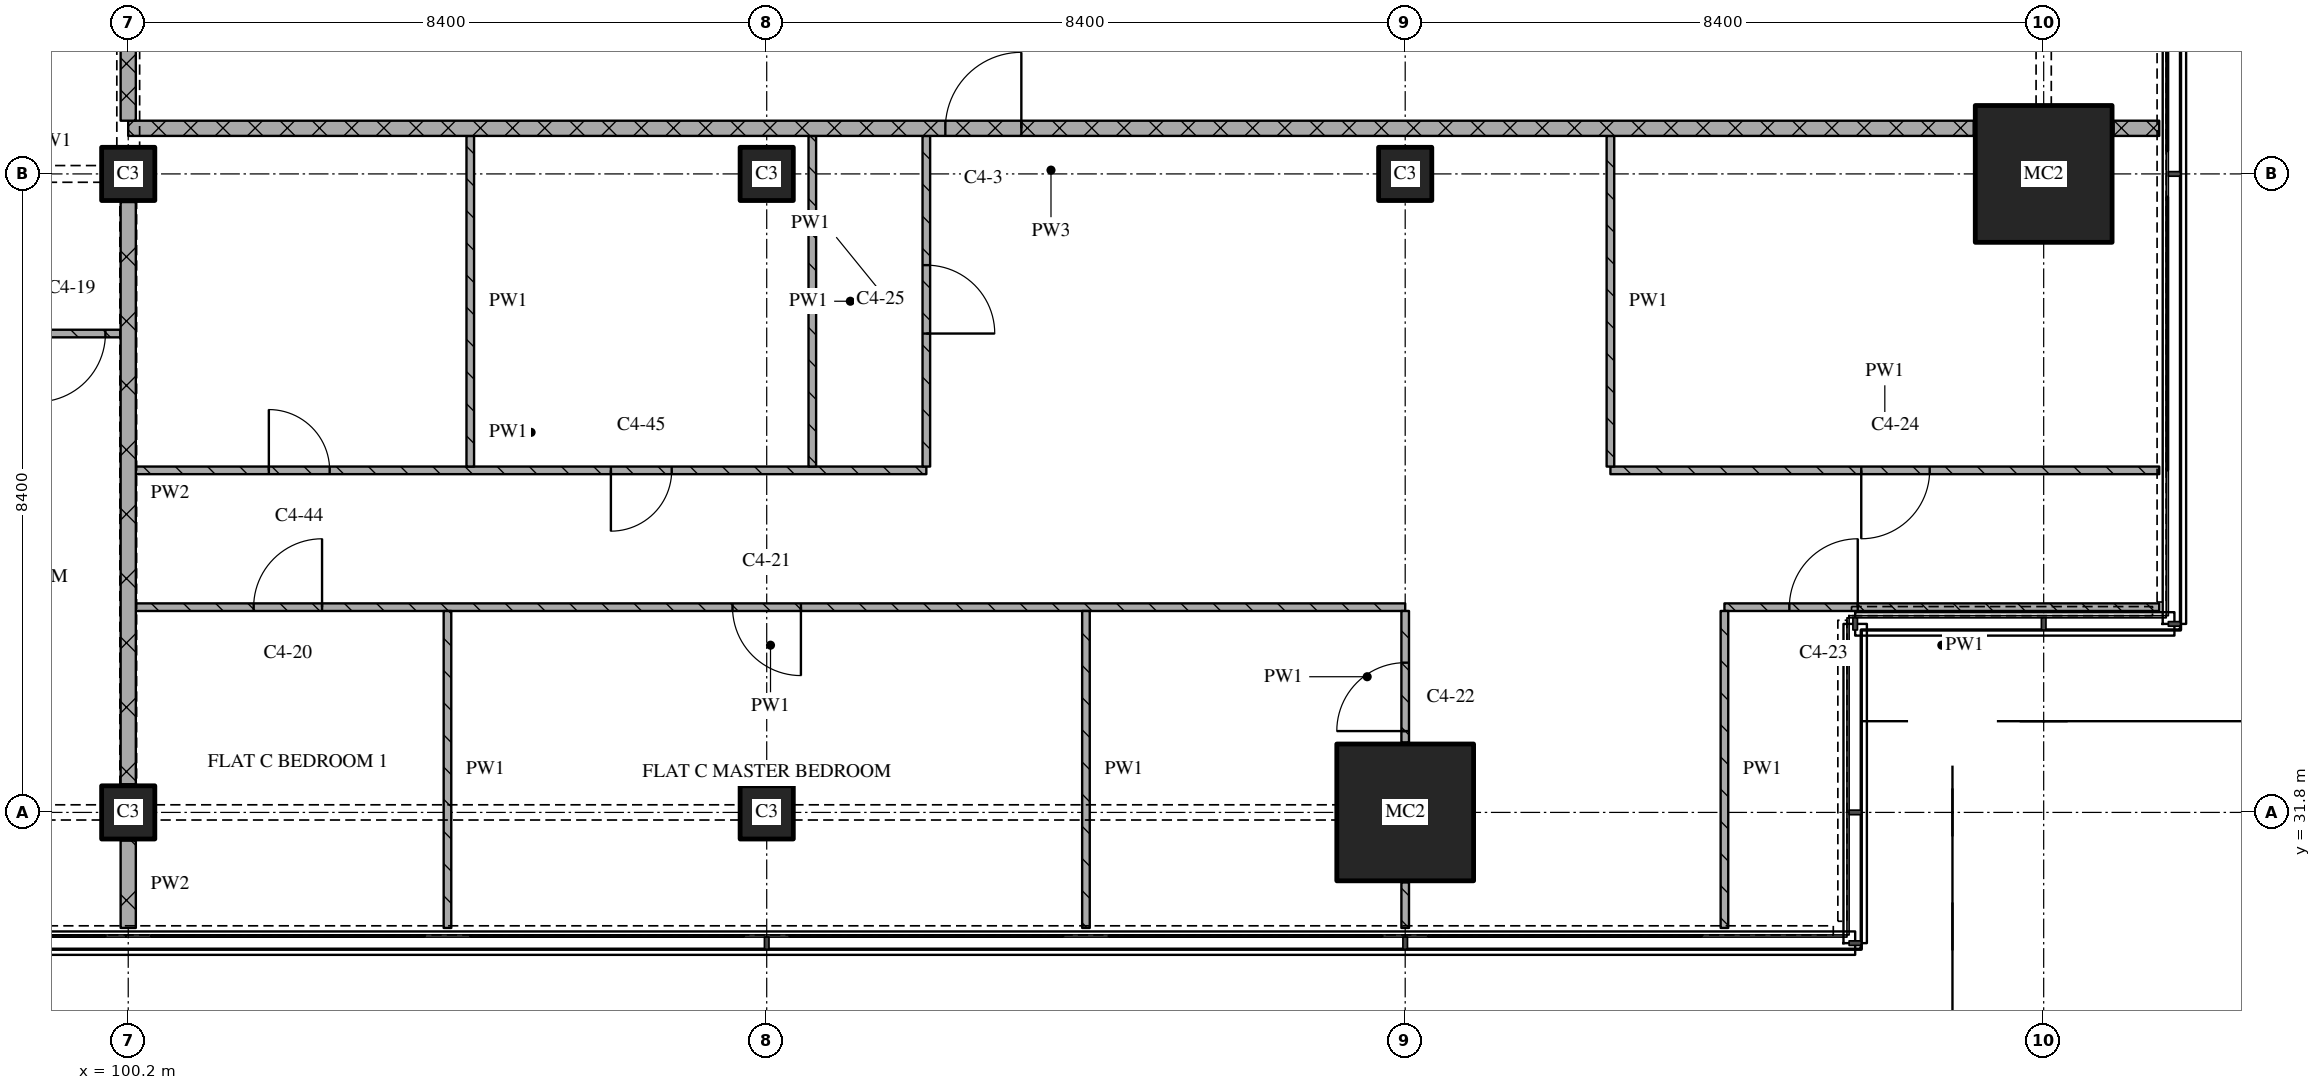
"""IFC4 building model, lengths in metres.
Left out: names, types, materials, properties, quantities, classifications, styles, units other than length and angle.
Written with IfcOpenShell. Run it as: python <this file> out.ifc"""

import sys

from ifc_helpers import new_model, si_unit, direction, frame, frame_2d, origin, origin_2d, place, context, subcontext, project, spatial, rectangle, extrude, element, fill, save


model = new_model("IFC4")
c1 = context("Model", 3, precision=1e-05, world=origin(), true_north=direction((0.0, 1.0)))
c2 = subcontext(c1, "Body", "Model", "MODEL_VIEW")
j1 = project(units=[si_unit("LENGTHUNIT", "METRE"), si_unit("PLANEANGLEUNIT", "RADIAN")], contexts=[c1])
p1 = place(None, origin())
s1 = spatial("IfcSite", under=j1, at=p1, CompositionType="ELEMENT")
p2 = place(p1, origin())
s2 = spatial("IfcBuilding", under=s1, at=p2, CompositionType="ELEMENT")
p3 = place(p2, frame((0.0, 0.0, 179.85)))
s3 = spatial("IfcBuildingStorey", under=s2, at=p3, CompositionType="ELEMENT", Elevation=179.85)
for number, where, z_axis, x_axis in (
    (1, (100.2, 31.8, 0.0), (0.0, 0.0, 1.0), (1.0, 0.0, 0.0)),
    (2, (100.2, 40.2, 0.0), (0.0, 0.0, 1.0), (1.0, 0.0, 0.0)),
    (3, (108.6, 31.8, 0.0), (0.0, 0.0, 1.0), (1.0, 0.0, 0.0)),
    (4, (108.6, 40.2, 0.0), (0.0, 0.0, 1.0), (1.0, 0.0, 0.0)),
):
    element("IfcColumn", number, at=place(p3, frame(where, z_axis=z_axis, x_axis=x_axis)), inside=s3, PredefinedType="COLUMN", context=c2, shape_type="SweptSolid", body=[
        extrude(rectangle(XDim=0.7, YDim=0.7, at=origin_2d()), origin(), (0.0, 0.0, 1.0), 3.6),
    ])
p4 = place(p3, frame((117.0, 31.8, 0.0), z_axis=(0.0, 0.0, 1.0), x_axis=(1.0, 0.0, 0.0)))
e5 = element("IfcColumn", 5, at=p4, inside=s3, PredefinedType="COLUMN", context=c2, shape_type="SweptSolid", body=[
    extrude(rectangle(XDim=1.8, YDim=1.8, at=origin_2d()), origin(), (0.0, 0.0, 1.0), 3.6),
])
p5 = place(p3, frame((117.0, 40.2, 0.0), z_axis=(0.0, 0.0, 1.0), x_axis=(1.0, 0.0, 0.0)))
e6 = element("IfcColumn", 6, at=p5, inside=s3, PredefinedType="COLUMN", context=c2, shape_type="SweptSolid", body=[
    extrude(rectangle(XDim=0.7, YDim=0.7, at=origin_2d()), origin(), (0.0, 0.0, 1.0), 3.6),
])
p6 = place(p3, frame((125.4, 40.2, 0.0), z_axis=(0.0, 0.0, 1.0), x_axis=(1.0, 0.0, 0.0)))
e7 = element("IfcColumn", 7, at=p6, inside=s3, PredefinedType="COLUMN", context=c2, shape_type="SweptSolid", body=[
    extrude(rectangle(XDim=1.8, YDim=1.8, at=origin_2d()), origin(), (0.0, 0.0, 1.0), 3.6),
])
p7 = place(p3, frame((117.0, 34.5, 0.0), z_axis=(0.0, 0.0, 1.0), x_axis=(-1.0, 0.0, 0.0)))
e8 = element("IfcWall", 8, at=p7, inside=s3, PredefinedType="PARTITIONING", context=c2, shape_type="SweptSolid", body=[
    extrude(rectangle(XDim=16.7, YDim=0.1, at=frame_2d((8.35, 0.0))), origin(), (0.0, 0.0, 1.0), 3.32),
])
p8 = place(p7, frame((7.95, 0.0, 0.0)))
e9 = element("IfcOpeningElement", 9, at=p8, cuts=e8, PredefinedType="OPENING", context=c2, shape_type="SweptSolid", body=[
    extrude(rectangle(XDim=0.9, YDim=2.1, at=frame_2d((0.45, 1.05))), frame((0.0, 0.06, 0.0), z_axis=(0.0, -1.0, 0.0), x_axis=(1.0, 0.0, 0.0)), (0.0, 0.0, 1.0), 0.12),
])
p9 = place(p7, frame((14.25, 0.0, 0.0)))
e10 = element("IfcOpeningElement", 10, at=p9, cuts=e8, PredefinedType="OPENING", context=c2, shape_type="SweptSolid", body=[
    extrude(rectangle(XDim=0.9, YDim=2.1, at=frame_2d((0.45, 1.05))), frame((0.0, 0.06, 0.0), z_axis=(0.0, -1.0, 0.0), x_axis=(1.0, 0.0, 0.0)), (0.0, 0.0, 1.0), 0.12),
])
p10 = place(p3, frame((126.92, 34.5, 0.0), z_axis=(0.0, 0.0, 1.0), x_axis=(-1.0, 0.0, 0.0)))
e11 = element("IfcWall", 11, at=p10, inside=s3, PredefinedType="PARTITIONING", context=c2, shape_type="SweptSolid", body=[
    extrude(rectangle(XDim=5.72, YDim=0.1, at=frame_2d((2.86, 0.0))), origin(), (0.0, 0.0, 1.0), 3.32),
])
p11 = place(p10, frame((3.966, 0.0, 0.0)))
e12 = element("IfcOpeningElement", 12, at=p11, cuts=e11, PredefinedType="OPENING", context=c2, shape_type="SweptSolid", body=[
    extrude(rectangle(XDim=0.9, YDim=2.1, at=frame_2d((0.45, 1.05))), frame((0.0, 0.06, 0.0), z_axis=(0.0, -1.0, 0.0), x_axis=(1.0, 0.0, 0.0)), (0.0, 0.0, 1.0), 0.12),
])
p12 = place(p3, frame((100.3, 36.3, 0.0), z_axis=(0.0, 0.0, 1.0), x_axis=(1.0, 0.0, 0.0)))
e13 = element("IfcWall", 13, at=p12, inside=s3, PredefinedType="PARTITIONING", context=c2, shape_type="SweptSolid", body=[
    extrude(rectangle(XDim=10.4, YDim=0.1, at=frame_2d((5.2, 0.0))), origin(), (0.0, 0.0, 1.0), 3.32),
])
p13 = place(p12, frame((1.75, 0.0, 0.0)))
e14 = element("IfcOpeningElement", 14, at=p13, cuts=e13, PredefinedType="OPENING", context=c2, shape_type="SweptSolid", body=[
    extrude(rectangle(XDim=0.8, YDim=2.1, at=frame_2d((0.4, 1.05))), frame((0.0, 0.06, 0.0), z_axis=(0.0, -1.0, 0.0), x_axis=(1.0, 0.0, 0.0)), (0.0, 0.0, 1.0), 0.12),
])
p14 = place(p12, frame((6.25, 0.0, 0.0)))
e15 = element("IfcOpeningElement", 15, at=p14, cuts=e13, PredefinedType="OPENING", context=c2, shape_type="SweptSolid", body=[
    extrude(rectangle(XDim=0.8, YDim=2.1, at=frame_2d((0.4, 1.05))), frame((0.0, 0.06, 0.0), z_axis=(0.0, -1.0, 0.0), x_axis=(1.0, 0.0, 0.0)), (0.0, 0.0, 1.0), 0.12),
])
p15 = place(p3, frame((119.7, 36.3, 0.0), z_axis=(0.0, 0.0, 1.0), x_axis=(1.0, 0.0, 0.0)))
e16 = element("IfcWall", 16, at=p15, inside=s3, PredefinedType="PARTITIONING", context=c2, shape_type="SweptSolid", body=[
    extrude(rectangle(XDim=7.22, YDim=0.1, at=frame_2d((3.61, 0.0))), origin(), (0.0, 0.0, 1.0), 3.32),
])
p16 = place(p15, frame((3.3, 0.0, 0.0)))
e17 = element("IfcOpeningElement", 17, at=p16, cuts=e16, PredefinedType="OPENING", context=c2, shape_type="SweptSolid", body=[
    extrude(rectangle(XDim=0.9, YDim=2.1, at=frame_2d((0.45, 1.05))), frame((0.0, 0.06, 0.0), z_axis=(0.0, -1.0, 0.0), x_axis=(1.0, 0.0, 0.0)), (0.0, 0.0, 1.0), 0.12),
])
p17 = place(p3, frame((89.7, 38.1, 0.0), z_axis=(0.0, 0.0, 1.0), x_axis=(1.0, 0.0, 0.0)))
e18 = element("IfcWall", 18, at=p17, inside=s3, PredefinedType="PARTITIONING", context=c2, shape_type="SweptSolid", body=[
    extrude(rectangle(XDim=10.4, YDim=0.1, at=frame_2d((5.2, 0.0))), origin(), (0.0, 0.0, 1.0), 3.32),
])
p18 = place(p17, frame((6.35, 0.0, 0.0)))
e19 = element("IfcOpeningElement", 19, at=p18, cuts=e18, PredefinedType="OPENING", context=c2, shape_type="SweptSolid", body=[
    extrude(rectangle(XDim=0.8, YDim=2.1, at=frame_2d((0.4, 1.05))), frame((0.0, 0.06, 0.0), z_axis=(0.0, -1.0, 0.0), x_axis=(1.0, 0.0, 0.0)), (0.0, 0.0, 1.0), 0.12),
])
p19 = place(p17, frame((9.3, 0.0, 0.0)))
e20 = element("IfcOpeningElement", 20, at=p19, cuts=e18, PredefinedType="OPENING", context=c2, shape_type="SweptSolid", body=[
    extrude(rectangle(XDim=0.9, YDim=2.1, at=frame_2d((0.45, 1.05))), frame((0.0, 0.06, 0.0), z_axis=(0.0, -1.0, 0.0), x_axis=(1.0, 0.0, 0.0)), (0.0, 0.0, 1.0), 0.12),
])
p20 = place(p3, frame((124.48, 40.8, 0.0), z_axis=(0.0, 0.0, 1.0), x_axis=(-1.0, 0.0, 0.0)))
e21 = element("IfcWall", 21, at=p20, inside=s3, PredefinedType="PARTITIONING", context=c2, shape_type="SweptSolid", body=[
    extrude(rectangle(XDim=24.28, YDim=0.2, at=frame_2d((12.14, 0.0))), origin(), (0.0, 0.0, 1.0), 3.32),
])
p21 = place(p20, frame((12.53, 0.0, 0.0)))
e22 = element("IfcOpeningElement", 22, at=p21, cuts=e21, PredefinedType="OPENING", context=c2, shape_type="SweptSolid", body=[
    extrude(rectangle(XDim=1.0, YDim=2.1, at=frame_2d((0.5, 1.05))), frame((0.0, 0.11, 0.0), z_axis=(0.0, -1.0, 0.0), x_axis=(1.0, 0.0, 0.0)), (0.0, 0.0, 1.0), 0.22),
])
p22 = place(p3, frame((126.32, 40.8, 0.0), z_axis=(0.0, 0.0, 1.0), x_axis=(1.0, 0.0, 0.0)))
e23 = element("IfcWall", 23, at=p22, inside=s3, PredefinedType="PARTITIONING", context=c2, shape_type="SweptSolid", body=[
    extrude(rectangle(XDim=0.6, YDim=0.2, at=frame_2d((0.3, 0.0))), origin(), (0.0, 0.0, 1.0), 3.32),
])
p23 = place(p3, frame((100.2, 43.1, 0.0), z_axis=(0.0, 0.0, 1.0), x_axis=(0.0, -1.0, 0.0)))
e24 = element("IfcWall", 24, at=p23, inside=s3, PredefinedType="PARTITIONING", context=c2, shape_type="SweptSolid", body=[
    extrude(rectangle(XDim=2.2, YDim=0.2, at=frame_2d((1.1, 0.0))), origin(), (0.0, 0.0, 1.0), 2.43),
])
p24 = place(p3, frame((100.2, 31.43, 0.0), z_axis=(0.0, 0.0, 1.0), x_axis=(0.0, -1.0, 0.0)))
e25 = element("IfcWall", 25, at=p24, inside=s3, PredefinedType="PARTITIONING", context=c2, shape_type="SweptSolid", body=[
    extrude(rectangle(XDim=1.15, YDim=0.2, at=frame_2d((0.575, 0.0))), origin(), (0.0, 0.0, 1.0), 3.32),
])
p25 = place(p3, frame((100.2, 39.83, 0.0), z_axis=(0.0, 0.0, 1.0), x_axis=(0.0, -1.0, 0.0)))
e26 = element("IfcWall", 26, at=p25, inside=s3, PredefinedType="PARTITIONING", context=c2, shape_type="SweptSolid", body=[
    extrude(rectangle(XDim=7.66, YDim=0.2, at=frame_2d((3.83, 0.0))), origin(), (0.0, 0.0, 1.0), 2.72),
])
p26 = place(p3, frame((104.4, 34.45, 0.0), z_axis=(0.0, 0.0, 1.0), x_axis=(0.0, -1.0, 0.0)))
e27 = element("IfcWall", 27, at=p26, inside=s3, PredefinedType="PARTITIONING", context=c2, shape_type="SweptSolid", body=[
    extrude(rectangle(XDim=4.17, YDim=0.1, at=frame_2d((2.085, 0.0))), origin(), (0.0, 0.0, 1.0), 3.32),
])
for number, where, z_axis, x_axis in (
    (28, (104.7, 40.7, 0.0), (0.0, 0.0, 1.0), (0.0, -1.0, 0.0)),
    (29, (109.2, 40.7, 0.0), (0.0, 0.0, 1.0), (0.0, -1.0, 0.0)),
):
    element("IfcWall", number, at=place(p3, frame(where, z_axis=z_axis, x_axis=x_axis)), inside=s3, PredefinedType="PARTITIONING", context=c2, shape_type="SweptSolid", body=[
        extrude(rectangle(XDim=4.35, YDim=0.1, at=frame_2d((2.175, 0.0))), origin(), (0.0, 0.0, 1.0), 3.32),
    ])
p27 = place(p3, frame((110.7, 36.35, 0.0), z_axis=(0.0, 0.0, 1.0), x_axis=(0.0, 1.0, 0.0)))
e30 = element("IfcWall", 30, at=p27, inside=s3, PredefinedType="PARTITIONING", context=c2, shape_type="SweptSolid", body=[
    extrude(rectangle(XDim=4.35, YDim=0.1, at=frame_2d((2.175, 0.0))), origin(), (0.0, 0.0, 1.0), 3.32),
])
p28 = place(p27, frame((1.75, 0.0, 0.0)))
e31 = element("IfcOpeningElement", 31, at=p28, cuts=e30, PredefinedType="OPENING", context=c2, shape_type="SweptSolid", body=[
    extrude(rectangle(XDim=0.9, YDim=2.1, at=frame_2d((0.45, 1.05))), frame((0.0, 0.06, 0.0), z_axis=(0.0, -1.0, 0.0), x_axis=(1.0, 0.0, 0.0)), (0.0, 0.0, 1.0), 0.12),
])
p29 = place(p3, frame((112.8, 34.45, 0.0), z_axis=(0.0, 0.0, 1.0), x_axis=(0.0, -1.0, 0.0)))
e32 = element("IfcWall", 32, at=p29, inside=s3, PredefinedType="PARTITIONING", context=c2, shape_type="SweptSolid", body=[
    extrude(rectangle(XDim=4.17, YDim=0.1, at=frame_2d((2.085, 0.0))), origin(), (0.0, 0.0, 1.0), 3.32),
])
p30 = place(p3, frame((117.0, 30.88, 0.0), z_axis=(0.0, 0.0, 1.0), x_axis=(0.0, -1.0, 0.0)))
e33 = element("IfcWall", 33, at=p30, inside=s3, PredefinedType="PARTITIONING", context=c2, shape_type="SweptSolid", body=[
    extrude(rectangle(XDim=0.6, YDim=0.1, at=frame_2d((0.3, 0.0))), origin(), (0.0, 0.0, 1.0), 3.32),
])
p31 = place(p3, frame((117.0, 32.72, 0.0), z_axis=(0.0, 0.0, 1.0), x_axis=(0.0, 1.0, 0.0)))
e34 = element("IfcWall", 34, at=p31, inside=s3, PredefinedType="PARTITIONING", context=c2, shape_type="SweptSolid", body=[
    extrude(rectangle(XDim=1.73, YDim=0.1, at=frame_2d((0.865, 0.0))), origin(), (0.0, 0.0, 1.0), 3.32),
])
p32 = place(p31, frame((0.15, 0.0, 0.0)))
e35 = element("IfcOpeningElement", 35, at=p32, cuts=e34, PredefinedType="OPENING", context=c2, shape_type="SweptSolid", body=[
    extrude(rectangle(XDim=0.9, YDim=2.1, at=frame_2d((0.45, 1.05))), frame((0.0, 0.06, 0.0), z_axis=(0.0, -1.0, 0.0), x_axis=(1.0, 0.0, 0.0)), (0.0, 0.0, 1.0), 0.12),
])
p33 = place(p3, frame((119.7, 40.7, 0.0), z_axis=(0.0, 0.0, 1.0), x_axis=(0.0, -1.0, 0.0)))
e36 = element("IfcWall", 36, at=p33, inside=s3, PredefinedType="PARTITIONING", context=c2, shape_type="SweptSolid", body=[
    extrude(rectangle(XDim=4.35, YDim=0.1, at=frame_2d((2.175, 0.0))), origin(), (0.0, 0.0, 1.0), 3.32),
])
p34 = place(p3, frame((121.2, 34.45, 0.0), z_axis=(0.0, 0.0, 1.0), x_axis=(0.0, -1.0, 0.0)))
e37 = element("IfcWall", 37, at=p34, inside=s3, PredefinedType="PARTITIONING", context=c2, shape_type="SweptSolid", body=[
    extrude(rectangle(XDim=4.17, YDim=0.1, at=frame_2d((2.085, 0.0))), origin(), (0.0, 0.0, 1.0), 3.32),
])
p35 = place(p8, origin())
e38 = element("IfcDoor", 38, at=p35, inside=s3, OperationType="SINGLE_SWING_LEFT", PredefinedType="DOOR", context=c2, shape_type="SweptSolid", body=[
    extrude(rectangle(XDim=0.9, YDim=2.1, at=frame_2d((0.45, 1.05))), frame((0.0, 0.025, 0.0), z_axis=(0.0, -1.0, 0.0), x_axis=(1.0, 0.0, 0.0)), (0.0, 0.0, 1.0), 0.05),
])
fill(e9, e38)
p36 = place(p9, origin())
e39 = element("IfcDoor", 39, at=p36, inside=s3, OperationType="SINGLE_SWING_RIGHT", PredefinedType="DOOR", context=c2, shape_type="SweptSolid", body=[
    extrude(rectangle(XDim=0.9, YDim=2.1, at=frame_2d((0.45, 1.05))), frame((0.0, 0.025, 0.0), z_axis=(0.0, -1.0, 0.0), x_axis=(1.0, 0.0, 0.0)), (0.0, 0.0, 1.0), 0.05),
])
fill(e10, e39)
p37 = place(p11, origin())
e40 = element("IfcDoor", 40, at=p37, inside=s3, OperationType="SINGLE_SWING_RIGHT", PredefinedType="DOOR", context=c2, shape_type="SweptSolid", body=[
    extrude(rectangle(XDim=0.9, YDim=2.1, at=frame_2d((0.45, 1.05))), frame((0.0, 0.025, 0.0), z_axis=(0.0, -1.0, 0.0), x_axis=(1.0, 0.0, 0.0)), (0.0, 0.0, 1.0), 0.05),
])
fill(e12, e40)
p38 = place(p13, origin())
e41 = element("IfcDoor", 41, at=p38, inside=s3, OperationType="SINGLE_SWING_LEFT", PredefinedType="DOOR", context=c2, shape_type="SweptSolid", body=[
    extrude(rectangle(XDim=0.8, YDim=2.1, at=frame_2d((0.4, 1.05))), frame((0.0, 0.025, 0.0), z_axis=(0.0, -1.0, 0.0), x_axis=(1.0, 0.0, 0.0)), (0.0, 0.0, 1.0), 0.05),
])
fill(e14, e41)
p39 = place(p14, origin())
e42 = element("IfcDoor", 42, at=p39, inside=s3, OperationType="SINGLE_SWING_RIGHT", PredefinedType="DOOR", context=c2, shape_type="SweptSolid", body=[
    extrude(rectangle(XDim=0.8, YDim=2.1, at=frame_2d((0.4, 1.05))), frame((0.0, 0.025, 0.0), z_axis=(0.0, -1.0, 0.0), x_axis=(1.0, 0.0, 0.0)), (0.0, 0.0, 1.0), 0.05),
])
fill(e15, e42)
p40 = place(p16, origin())
e43 = element("IfcDoor", 43, at=p40, inside=s3, OperationType="SINGLE_SWING_RIGHT", PredefinedType="DOOR", context=c2, shape_type="SweptSolid", body=[
    extrude(rectangle(XDim=0.9, YDim=2.1, at=frame_2d((0.45, 1.05))), frame((0.0, 0.025, 0.0), z_axis=(0.0, -1.0, 0.0), x_axis=(1.0, 0.0, 0.0)), (0.0, 0.0, 1.0), 0.05),
])
fill(e17, e43)
p41 = place(p19, origin())
e44 = element("IfcDoor", 44, at=p41, inside=s3, OperationType="SINGLE_SWING_RIGHT", PredefinedType="DOOR", context=c2, shape_type="SweptSolid", body=[
    extrude(rectangle(XDim=0.9, YDim=2.1, at=frame_2d((0.45, 1.05))), frame((0.0, 0.025, 0.0), z_axis=(0.0, -1.0, 0.0), x_axis=(1.0, 0.0, 0.0)), (0.0, 0.0, 1.0), 0.05),
])
fill(e20, e44)
p42 = place(p21, origin())
e45 = element("IfcDoor", 45, at=p42, inside=s3, OperationType="SINGLE_SWING_RIGHT", PredefinedType="DOOR", context=c2, shape_type="SweptSolid", body=[
    extrude(rectangle(XDim=1.0, YDim=2.1, at=frame_2d((0.5, 1.05))), frame((0.0, 0.025, 0.0), z_axis=(0.0, -1.0, 0.0), x_axis=(1.0, 0.0, 0.0)), (0.0, 0.0, 1.0), 0.05),
])
fill(e22, e45)
p43 = place(p28, origin())
e46 = element("IfcDoor", 46, at=p43, inside=s3, OperationType="SINGLE_SWING_RIGHT", PredefinedType="DOOR", context=c2, shape_type="SweptSolid", body=[
    extrude(rectangle(XDim=0.9, YDim=2.1, at=frame_2d((0.45, 1.05))), frame((0.0, 0.025, 0.0), z_axis=(0.0, -1.0, 0.0), x_axis=(1.0, 0.0, 0.0)), (0.0, 0.0, 1.0), 0.05),
])
fill(e31, e46)
p44 = place(p32, origin())
e47 = element("IfcDoor", 47, at=p44, inside=s3, OperationType="SINGLE_SWING_LEFT", PredefinedType="DOOR", context=c2, shape_type="SweptSolid", body=[
    extrude(rectangle(XDim=0.9, YDim=2.1, at=frame_2d((0.45, 1.05))), frame((0.0, 0.025, 0.0), z_axis=(0.0, -1.0, 0.0), x_axis=(1.0, 0.0, 0.0)), (0.0, 0.0, 1.0), 0.05),
])
fill(e35, e47)
save(model, sys.argv[1])
